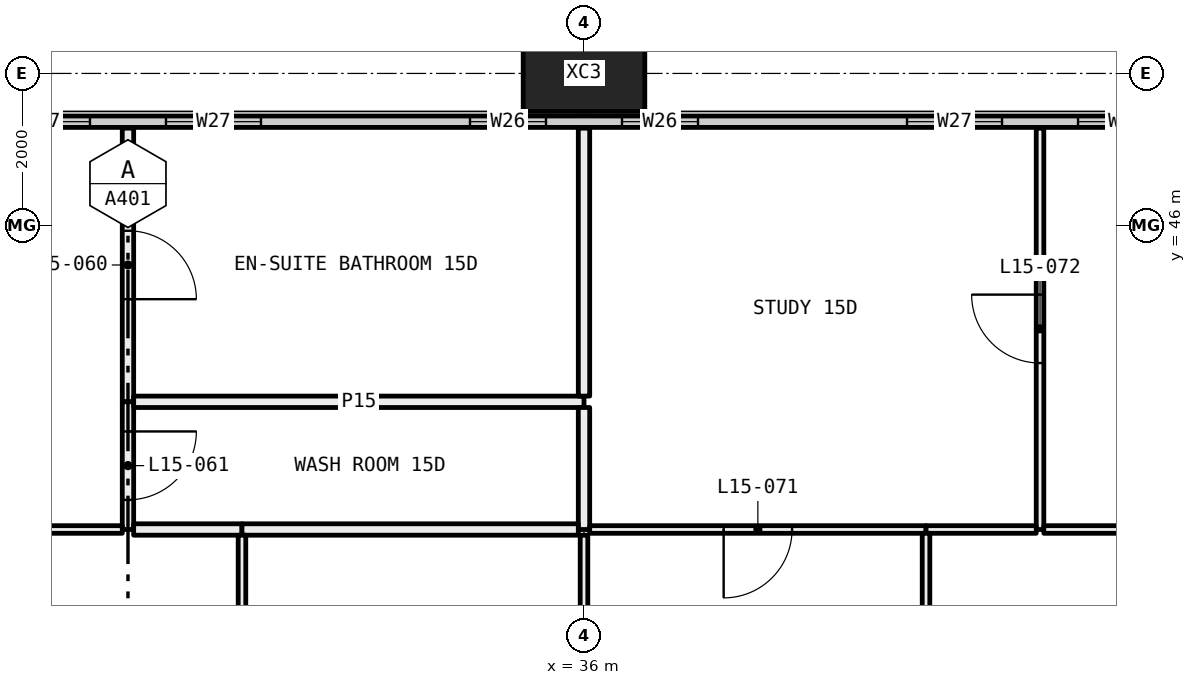
"""IFC4 building model, lengths in metres.
Left out: names, types, materials, properties, quantities, classifications, styles, units other than length and angle.
Written with IfcOpenShell. Run it as: python <this file> out.ifc"""

import sys

from ifc_helpers import new_model, si_unit, direction, frame, frame_2d, origin, origin_2d, place, context, subcontext, project, spatial, rectangle, hollow_rectangle, extrude, element, fill, save


model = new_model("IFC4")
c1 = context("Model", 3, precision=1e-05, world=origin(), true_north=direction((0.0, 1.0)))
c2 = subcontext(c1, "Body", "Model", "MODEL_VIEW")
j1 = project(units=[si_unit("LENGTHUNIT", "METRE"), si_unit("PLANEANGLEUNIT", "RADIAN")], contexts=[c1])
p1 = place(None, origin())
s1 = spatial("IfcSite", under=j1, at=p1, CompositionType="ELEMENT")
p2 = place(p1, origin())
s2 = spatial("IfcBuilding", under=s1, at=p2, CompositionType="ELEMENT")
p3 = place(p2, frame((0.0, 0.0, 64.5)))
s3 = spatial("IfcBuildingStorey", under=s2, at=p3, CompositionType="ELEMENT", Elevation=64.5)
p4 = place(p3, frame((36.0, 48.0, -0.4), z_axis=(0.0, 0.0, 1.0), x_axis=(1.0, 0.0, 0.0)))
e1 = element("IfcColumn", 1, at=p4, inside=s3, PredefinedType="COLUMN", context=c2, shape_type="SweptSolid", body=[
    extrude(hollow_rectangle(XDim=1.6, YDim=1.0, WallThickness=0.065, at=origin_2d()), origin(), (0.0, 0.0, 1.0), 3.45),
])
p5 = place(p3, frame((6.56, 47.365, 0.0), z_axis=(0.0, 0.0, 1.0), x_axis=(1.0, 0.0, 0.0)))
e2 = element("IfcWall", 2, at=p5, inside=s3, PredefinedType="ELEMENTEDWALL", context=c2, shape_type="SweptSolid", body=[
    extrude(rectangle(XDim=58.88, YDim=0.15, at=frame_2d((29.44, 0.0))), origin(), (0.0, 0.0, 1.0), 3.05),
])
p6 = place(p5, frame((0.44, 0.0, 0.45)))
e3 = element("IfcOpeningElement", 3, at=p6, cuts=e2, PredefinedType="OPENING", context=c2, shape_type="SweptSolid", body=[
    extrude(rectangle(XDim=4.5, YDim=2.55, at=frame_2d((2.25, 1.275))), frame((0.0, 0.085, 0.0), z_axis=(0.0, -1.0, 0.0), x_axis=(1.0, 0.0, 0.0)), (0.0, 0.0, 1.0), 0.17),
])
p7 = place(p5, frame((5.94, 0.0, 0.45)))
e4 = element("IfcOpeningElement", 4, at=p7, cuts=e2, PredefinedType="OPENING", context=c2, shape_type="SweptSolid", body=[
    extrude(rectangle(XDim=1.0, YDim=2.55, at=frame_2d((0.5, 1.275))), frame((0.0, 0.085, 0.0), z_axis=(0.0, -1.0, 0.0), x_axis=(1.0, 0.0, 0.0)), (0.0, 0.0, 1.0), 0.17),
])
p8 = place(p5, frame((9.69, 0.0, 0.45)))
e5 = element("IfcOpeningElement", 5, at=p8, cuts=e2, PredefinedType="OPENING", context=c2, shape_type="SweptSolid", body=[
    extrude(rectangle(XDim=1.25, YDim=2.55, at=frame_2d((0.625, 1.275))), frame((0.0, 0.085, 0.0), z_axis=(0.0, -1.0, 0.0), x_axis=(1.0, 0.0, 0.0)), (0.0, 0.0, 1.0), 0.17),
])
p9 = place(p5, frame((11.94, 0.0, 0.45)))
e6 = element("IfcOpeningElement", 6, at=p9, cuts=e2, PredefinedType="OPENING", context=c2, shape_type="SweptSolid", body=[
    extrude(rectangle(XDim=1.25, YDim=2.55, at=frame_2d((0.625, 1.275))), frame((0.0, 0.085, 0.0), z_axis=(0.0, -1.0, 0.0), x_axis=(1.0, 0.0, 0.0)), (0.0, 0.0, 1.0), 0.17),
])
p10 = place(p5, frame((15.94, 0.0, 0.45)))
e7 = element("IfcOpeningElement", 7, at=p10, cuts=e2, PredefinedType="OPENING", context=c2, shape_type="SweptSolid", body=[
    extrude(rectangle(XDim=1.0, YDim=2.55, at=frame_2d((0.5, 1.275))), frame((0.0, 0.085, 0.0), z_axis=(0.0, -1.0, 0.0), x_axis=(1.0, 0.0, 0.0)), (0.0, 0.0, 1.0), 0.17),
])
p11 = place(p5, frame((17.94, 0.0, 0.45)))
e8 = element("IfcOpeningElement", 8, at=p11, cuts=e2, PredefinedType="OPENING", context=c2, shape_type="SweptSolid", body=[
    extrude(rectangle(XDim=1.0, YDim=2.55, at=frame_2d((0.5, 1.275))), frame((0.0, 0.085, 0.0), z_axis=(0.0, -1.0, 0.0), x_axis=(1.0, 0.0, 0.0)), (0.0, 0.0, 1.0), 0.17),
])
p12 = place(p5, frame((21.69, 0.0, 0.45)))
e9 = element("IfcOpeningElement", 9, at=p12, cuts=e2, PredefinedType="OPENING", context=c2, shape_type="SweptSolid", body=[
    extrude(rectangle(XDim=1.25, YDim=2.55, at=frame_2d((0.625, 1.275))), frame((0.0, 0.085, 0.0), z_axis=(0.0, -1.0, 0.0), x_axis=(1.0, 0.0, 0.0)), (0.0, 0.0, 1.0), 0.17),
])
p13 = place(p5, frame((23.94, 0.0, 0.45)))
e10 = element("IfcOpeningElement", 10, at=p13, cuts=e2, PredefinedType="OPENING", context=c2, shape_type="SweptSolid", body=[
    extrude(rectangle(XDim=1.25, YDim=2.55, at=frame_2d((0.625, 1.275))), frame((0.0, 0.085, 0.0), z_axis=(0.0, -1.0, 0.0), x_axis=(1.0, 0.0, 0.0)), (0.0, 0.0, 1.0), 0.17),
])
p14 = place(p5, frame((27.94, 0.0, 0.45)))
e11 = element("IfcOpeningElement", 11, at=p14, cuts=e2, PredefinedType="OPENING", context=c2, shape_type="SweptSolid", body=[
    extrude(rectangle(XDim=1.0, YDim=2.55, at=frame_2d((0.5, 1.275))), frame((0.0, 0.085, 0.0), z_axis=(0.0, -1.0, 0.0), x_axis=(1.0, 0.0, 0.0)), (0.0, 0.0, 1.0), 0.17),
])
p15 = place(p5, frame((29.94, 0.0, 0.45)))
e12 = element("IfcOpeningElement", 12, at=p15, cuts=e2, PredefinedType="OPENING", context=c2, shape_type="SweptSolid", body=[
    extrude(rectangle(XDim=1.0, YDim=2.55, at=frame_2d((0.5, 1.275))), frame((0.0, 0.085, 0.0), z_axis=(0.0, -1.0, 0.0), x_axis=(1.0, 0.0, 0.0)), (0.0, 0.0, 1.0), 0.17),
])
p16 = place(p5, frame((33.69, 0.0, 0.45)))
e13 = element("IfcOpeningElement", 13, at=p16, cuts=e2, PredefinedType="OPENING", context=c2, shape_type="SweptSolid", body=[
    extrude(rectangle(XDim=1.25, YDim=2.55, at=frame_2d((0.625, 1.275))), frame((0.0, 0.085, 0.0), z_axis=(0.0, -1.0, 0.0), x_axis=(1.0, 0.0, 0.0)), (0.0, 0.0, 1.0), 0.17),
])
p17 = place(p5, frame((35.94, 0.0, 0.45)))
e14 = element("IfcOpeningElement", 14, at=p17, cuts=e2, PredefinedType="OPENING", context=c2, shape_type="SweptSolid", body=[
    extrude(rectangle(XDim=1.25, YDim=2.55, at=frame_2d((0.625, 1.275))), frame((0.0, 0.085, 0.0), z_axis=(0.0, -1.0, 0.0), x_axis=(1.0, 0.0, 0.0)), (0.0, 0.0, 1.0), 0.17),
])
p18 = place(p5, frame((39.94, 0.0, 0.45)))
e15 = element("IfcOpeningElement", 15, at=p18, cuts=e2, PredefinedType="OPENING", context=c2, shape_type="SweptSolid", body=[
    extrude(rectangle(XDim=1.0, YDim=2.55, at=frame_2d((0.5, 1.275))), frame((0.0, 0.085, 0.0), z_axis=(0.0, -1.0, 0.0), x_axis=(1.0, 0.0, 0.0)), (0.0, 0.0, 1.0), 0.17),
])
p19 = place(p5, frame((41.94, 0.0, 0.45)))
e16 = element("IfcOpeningElement", 16, at=p19, cuts=e2, PredefinedType="OPENING", context=c2, shape_type="SweptSolid", body=[
    extrude(rectangle(XDim=1.0, YDim=2.55, at=frame_2d((0.5, 1.275))), frame((0.0, 0.085, 0.0), z_axis=(0.0, -1.0, 0.0), x_axis=(1.0, 0.0, 0.0)), (0.0, 0.0, 1.0), 0.17),
])
p20 = place(p5, frame((45.69, 0.0, 0.45)))
e17 = element("IfcOpeningElement", 17, at=p20, cuts=e2, PredefinedType="OPENING", context=c2, shape_type="SweptSolid", body=[
    extrude(rectangle(XDim=1.25, YDim=2.55, at=frame_2d((0.625, 1.275))), frame((0.0, 0.085, 0.0), z_axis=(0.0, -1.0, 0.0), x_axis=(1.0, 0.0, 0.0)), (0.0, 0.0, 1.0), 0.17),
])
p21 = place(p5, frame((47.94, 0.0, 0.45)))
e18 = element("IfcOpeningElement", 18, at=p21, cuts=e2, PredefinedType="OPENING", context=c2, shape_type="SweptSolid", body=[
    extrude(rectangle(XDim=1.25, YDim=2.55, at=frame_2d((0.625, 1.275))), frame((0.0, 0.085, 0.0), z_axis=(0.0, -1.0, 0.0), x_axis=(1.0, 0.0, 0.0)), (0.0, 0.0, 1.0), 0.17),
])
p22 = place(p5, frame((51.94, 0.0, 0.45)))
e19 = element("IfcOpeningElement", 19, at=p22, cuts=e2, PredefinedType="OPENING", context=c2, shape_type="SweptSolid", body=[
    extrude(rectangle(XDim=1.0, YDim=2.55, at=frame_2d((0.5, 1.275))), frame((0.0, 0.085, 0.0), z_axis=(0.0, -1.0, 0.0), x_axis=(1.0, 0.0, 0.0)), (0.0, 0.0, 1.0), 0.17),
])
p23 = place(p5, frame((53.94, 0.0, 0.45)))
e20 = element("IfcOpeningElement", 20, at=p23, cuts=e2, PredefinedType="OPENING", context=c2, shape_type="SweptSolid", body=[
    extrude(rectangle(XDim=4.5, YDim=2.55, at=frame_2d((2.25, 1.275))), frame((0.0, 0.085, 0.0), z_axis=(0.0, -1.0, 0.0), x_axis=(1.0, 0.0, 0.0)), (0.0, 0.0, 1.0), 0.17),
])
p24 = place(p3, frame((30.0, 43.68, 0.0), z_axis=(0.0, 0.0, 1.0), x_axis=(0.0, 1.0, 0.0)))
e21 = element("IfcWall", 21, at=p24, inside=s3, PredefinedType="PARTITIONING", context=c2, shape_type="SweptSolid", body=[
    extrude(rectangle(XDim=3.6, YDim=0.15, at=frame_2d((1.8, 0.0))), origin(), (0.0, 0.0, 1.0), 3.05),
])
p25 = place(p24, frame((1.35, 0.0, 0.0)))
e22 = element("IfcOpeningElement", 22, at=p25, cuts=e21, PredefinedType="OPENING", context=c2, shape_type="SweptSolid", body=[
    extrude(rectangle(XDim=0.9, YDim=2.1, at=frame_2d((0.45, 1.05))), frame((0.0, 0.085, 0.0), z_axis=(0.0, -1.0, 0.0), x_axis=(1.0, 0.0, 0.0)), (0.0, 0.0, 1.0), 0.17),
])
p26 = place(p3, frame((30.0, 42.0, 0.0), z_axis=(0.0, 0.0, 1.0), x_axis=(0.0, 1.0, 0.0)))
e23 = element("IfcWall", 23, at=p26, inside=s3, PredefinedType="PARTITIONING", context=c2, shape_type="SweptSolid", body=[
    extrude(rectangle(XDim=1.68, YDim=0.15, at=frame_2d((0.84, 0.0))), origin(), (0.0, 0.0, 1.0), 3.05),
])
p27 = place(p26, frame((0.39, 0.0, 0.0)))
e24 = element("IfcOpeningElement", 24, at=p27, cuts=e23, PredefinedType="OPENING", context=c2, shape_type="SweptSolid", body=[
    extrude(rectangle(XDim=0.9, YDim=2.1, at=frame_2d((0.45, 1.05))), frame((0.0, 0.085, 0.0), z_axis=(0.0, -1.0, 0.0), x_axis=(1.0, 0.0, 0.0)), (0.0, 0.0, 1.0), 0.17),
])
p28 = place(p3, frame((26.0, 42.0, 0.0), z_axis=(0.0, 0.0, 1.0), x_axis=(1.0, 0.0, 0.0)))
e25 = element("IfcWall", 25, at=p28, inside=s3, PredefinedType="PARTITIONING", context=c2, shape_type="SweptSolid", body=[
    extrude(rectangle(XDim=3.925, YDim=0.1, at=frame_2d((1.962, 0.0))), origin(), (0.0, 0.0, 1.0), 3.05),
])
p29 = place(p28, frame((1.512, 0.0, 0.0)))
e26 = element("IfcOpeningElement", 26, at=p29, cuts=e25, PredefinedType="OPENING", context=c2, shape_type="SweptSolid", body=[
    extrude(rectangle(XDim=0.9, YDim=2.1, at=frame_2d((0.45, 1.05))), frame((0.0, 0.06, 0.0), z_axis=(0.0, -1.0, 0.0), x_axis=(1.0, 0.0, 0.0)), (0.0, 0.0, 1.0), 0.12),
])
p30 = place(p3, frame((30.075, 43.68, 0.0), z_axis=(0.0, 0.0, 1.0), x_axis=(1.0, 0.0, 0.0)))
e27 = element("IfcWall", 27, at=p30, inside=s3, PredefinedType="PARTITIONING", context=c2, shape_type="SweptSolid", body=[
    extrude(rectangle(XDim=5.925, YDim=0.15, at=frame_2d((2.962, 0.0))), origin(), (0.0, 0.0, 1.0), 2.45),
])
p31 = place(p3, frame((36.0, 43.755, 0.0), z_axis=(0.0, 0.0, 1.0), x_axis=(0.0, 1.0, 0.0)))
e28 = element("IfcWall", 28, at=p31, inside=s3, PredefinedType="PARTITIONING", context=c2, shape_type="SweptSolid", body=[
    extrude(rectangle(XDim=3.525, YDim=0.15, at=frame_2d((1.763, 0.0))), origin(), (0.0, 0.0, 1.0), 2.45),
])
p32 = place(p3, frame((36.0, 42.0, 0.0), z_axis=(0.0, 0.0, 1.0), x_axis=(0.0, 1.0, 0.0)))
e29 = element("IfcWall", 29, at=p32, inside=s3, PredefinedType="PARTITIONING", context=c2, shape_type="SweptSolid", body=[
    extrude(rectangle(XDim=1.605, YDim=0.15, at=frame_2d((0.802, 0.0))), origin(), (0.0, 0.0, 1.0), 2.45),
])
p33 = place(p3, frame((30.075, 42.0, 0.0), z_axis=(0.0, 0.0, 1.0), x_axis=(1.0, 0.0, 0.0)))
e30 = element("IfcWall", 30, at=p33, inside=s3, PredefinedType="PARTITIONING", context=c2, shape_type="SweptSolid", body=[
    extrude(rectangle(XDim=1.425, YDim=0.15, at=frame_2d((0.712, 0.0))), origin(), (0.0, 0.0, 1.0), 3.05),
])
p34 = place(p3, frame((31.5, 42.0, 0.0), z_axis=(0.0, 0.0, 1.0), x_axis=(1.0, 0.0, 0.0)))
e31 = element("IfcWall", 31, at=p34, inside=s3, PredefinedType="PARTITIONING", context=c2, shape_type="SweptSolid", body=[
    extrude(rectangle(XDim=4.425, YDim=0.15, at=frame_2d((2.212, 0.0))), origin(), (0.0, 0.0, 1.0), 2.45),
])
p35 = place(p3, frame((42.0, 42.0, 0.0), z_axis=(0.0, 0.0, 1.0), x_axis=(0.0, 1.0, 0.0)))
e32 = element("IfcWall", 32, at=p35, inside=s3, PredefinedType="PARTITIONING", context=c2, shape_type="SweptSolid", body=[
    extrude(rectangle(XDim=5.28, YDim=0.1, at=frame_2d((2.64, 0.0))), origin(), (0.0, 0.0, 1.0), 3.05),
])
p36 = place(p35, frame((2.19, 0.0, 0.0)))
e33 = element("IfcOpeningElement", 33, at=p36, cuts=e32, PredefinedType="OPENING", context=c2, shape_type="SweptSolid", body=[
    extrude(rectangle(XDim=0.9, YDim=2.1, at=frame_2d((0.45, 1.05))), frame((0.0, 0.06, 0.0), z_axis=(0.0, -1.0, 0.0), x_axis=(1.0, 0.0, 0.0)), (0.0, 0.0, 1.0), 0.12),
])
p37 = place(p3, frame((36.075, 42.0, 0.0), z_axis=(0.0, 0.0, 1.0), x_axis=(1.0, 0.0, 0.0)))
e34 = element("IfcWall", 34, at=p37, inside=s3, PredefinedType="PARTITIONING", context=c2, shape_type="SweptSolid", body=[
    extrude(rectangle(XDim=4.425, YDim=0.1, at=frame_2d((2.212, 0.0))), origin(), (0.0, 0.0, 1.0), 2.45),
])
p38 = place(p37, frame((1.762, 0.0, 0.0)))
e35 = element("IfcOpeningElement", 35, at=p38, cuts=e34, PredefinedType="OPENING", context=c2, shape_type="SweptSolid", body=[
    extrude(rectangle(XDim=0.9, YDim=2.1, at=frame_2d((0.45, 1.05))), frame((0.0, 0.06, 0.0), z_axis=(0.0, -1.0, 0.0), x_axis=(1.0, 0.0, 0.0)), (0.0, 0.0, 1.0), 0.12),
])
p39 = place(p3, frame((40.5, 42.0, 0.0), z_axis=(0.0, 0.0, 1.0), x_axis=(1.0, 0.0, 0.0)))
e36 = element("IfcWall", 36, at=p39, inside=s3, PredefinedType="PARTITIONING", context=c2, shape_type="SweptSolid", body=[
    extrude(rectangle(XDim=1.45, YDim=0.1, at=frame_2d((0.725, 0.0))), origin(), (0.0, 0.0, 1.0), 3.05),
])
p40 = place(p3, frame((42.05, 42.0, 0.0), z_axis=(0.0, 0.0, 1.0), x_axis=(1.0, 0.0, 0.0)))
e37 = element("IfcWall", 37, at=p40, inside=s3, PredefinedType="PARTITIONING", context=c2, shape_type="SweptSolid", body=[
    extrude(rectangle(XDim=3.95, YDim=0.1, at=frame_2d((1.975, 0.0))), origin(), (0.0, 0.0, 1.0), 3.05),
])
p41 = place(p3, frame((31.5, 36.1, 0.0), z_axis=(0.0, 0.0, 1.0), x_axis=(0.0, 1.0, 0.0)))
e38 = element("IfcWall", 38, at=p41, inside=s3, PredefinedType="PARTITIONING", context=c2, shape_type="SweptSolid", body=[
    extrude(rectangle(XDim=5.825, YDim=0.1, at=frame_2d((2.913, 0.0))), origin(), (0.0, 0.0, 1.0), 3.05),
])
p42 = place(p41, frame((2.462, 0.0, 0.0)))
e39 = element("IfcOpeningElement", 39, at=p42, cuts=e38, PredefinedType="OPENING", context=c2, shape_type="SweptSolid", body=[
    extrude(rectangle(XDim=0.9, YDim=2.1, at=frame_2d((0.45, 1.05))), frame((0.0, 0.06, 0.0), z_axis=(0.0, -1.0, 0.0), x_axis=(1.0, 0.0, 0.0)), (0.0, 0.0, 1.0), 0.12),
])
p43 = place(p3, frame((36.0, 36.8, 0.0), z_axis=(0.0, 0.0, 1.0), x_axis=(0.0, 1.0, 0.0)))
e40 = element("IfcWall", 40, at=p43, inside=s3, PredefinedType="PARTITIONING", context=c2, shape_type="SweptSolid", body=[
    extrude(rectangle(XDim=5.125, YDim=0.1, at=frame_2d((2.562, 0.0))), origin(), (0.0, 0.0, 1.0), 2.45),
])
p44 = place(p43, frame((2.113, 0.0, 0.0)))
e41 = element("IfcOpeningElement", 41, at=p44, cuts=e40, PredefinedType="OPENING", context=c2, shape_type="SweptSolid", body=[
    extrude(rectangle(XDim=0.9, YDim=2.1, at=frame_2d((0.45, 1.05))), frame((0.0, 0.06, 0.0), z_axis=(0.0, -1.0, 0.0), x_axis=(1.0, 0.0, 0.0)), (0.0, 0.0, 1.0), 0.12),
])
p45 = place(p3, frame((40.5, 36.1, 0.0), z_axis=(0.0, 0.0, 1.0), x_axis=(0.0, 1.0, 0.0)))
e42 = element("IfcWall", 42, at=p45, inside=s3, PredefinedType="PARTITIONING", context=c2, shape_type="SweptSolid", body=[
    extrude(rectangle(XDim=5.85, YDim=0.1, at=frame_2d((2.925, 0.0))), origin(), (0.0, 0.0, 1.0), 3.05),
])
p46 = place(p45, frame((2.475, 0.0, 0.0)))
e43 = element("IfcOpeningElement", 43, at=p46, cuts=e42, PredefinedType="OPENING", context=c2, shape_type="SweptSolid", body=[
    extrude(rectangle(XDim=0.9, YDim=2.1, at=frame_2d((0.45, 1.05))), frame((0.0, 0.06, 0.0), z_axis=(0.0, -1.0, 0.0), x_axis=(1.0, 0.0, 0.0)), (0.0, 0.0, 1.0), 0.12),
])
p47 = place(p12, origin())
e44 = element("IfcWindow", 44, at=p47, inside=s3, PartitioningType="SINGLE_PANEL", PredefinedType="WINDOW", context=c2, shape_type="SweptSolid", body=[
    extrude(rectangle(XDim=1.25, YDim=2.55, at=frame_2d((0.625, 1.275))), frame((0.0, 0.03, 0.0), z_axis=(0.0, -1.0, 0.0), x_axis=(1.0, 0.0, 0.0)), (0.0, 0.0, 1.0), 0.06),
])
fill(e9, e44)
p48 = place(p13, origin())
e45 = element("IfcWindow", 45, at=p48, inside=s3, PartitioningType="SINGLE_PANEL", PredefinedType="WINDOW", context=c2, shape_type="SweptSolid", body=[
    extrude(rectangle(XDim=1.25, YDim=2.55, at=frame_2d((0.625, 1.275))), frame((0.0, 0.03, 0.0), z_axis=(0.0, -1.0, 0.0), x_axis=(1.0, 0.0, 0.0)), (0.0, 0.0, 1.0), 0.06),
])
fill(e10, e45)
p49 = place(p14, origin())
e46 = element("IfcWindow", 46, at=p49, inside=s3, PartitioningType="SINGLE_PANEL", PredefinedType="WINDOW", context=c2, shape_type="SweptSolid", body=[
    extrude(rectangle(XDim=1.0, YDim=2.55, at=frame_2d((0.5, 1.275))), frame((0.0, 0.03, 0.0), z_axis=(0.0, -1.0, 0.0), x_axis=(1.0, 0.0, 0.0)), (0.0, 0.0, 1.0), 0.06),
])
fill(e11, e46)
p50 = place(p15, origin())
e47 = element("IfcWindow", 47, at=p50, inside=s3, PartitioningType="SINGLE_PANEL", PredefinedType="WINDOW", context=c2, shape_type="SweptSolid", body=[
    extrude(rectangle(XDim=1.0, YDim=2.55, at=frame_2d((0.5, 1.275))), frame((0.0, 0.03, 0.0), z_axis=(0.0, -1.0, 0.0), x_axis=(1.0, 0.0, 0.0)), (0.0, 0.0, 1.0), 0.06),
])
fill(e12, e47)
p51 = place(p16, origin())
e48 = element("IfcWindow", 48, at=p51, inside=s3, PartitioningType="SINGLE_PANEL", PredefinedType="WINDOW", context=c2, shape_type="SweptSolid", body=[
    extrude(rectangle(XDim=1.25, YDim=2.55, at=frame_2d((0.625, 1.275))), frame((0.0, 0.03, 0.0), z_axis=(0.0, -1.0, 0.0), x_axis=(1.0, 0.0, 0.0)), (0.0, 0.0, 1.0), 0.06),
])
fill(e13, e48)
p52 = place(p17, origin())
e49 = element("IfcWindow", 49, at=p52, inside=s3, PartitioningType="SINGLE_PANEL", PredefinedType="WINDOW", context=c2, shape_type="SweptSolid", body=[
    extrude(rectangle(XDim=1.25, YDim=2.55, at=frame_2d((0.625, 1.275))), frame((0.0, 0.03, 0.0), z_axis=(0.0, -1.0, 0.0), x_axis=(1.0, 0.0, 0.0)), (0.0, 0.0, 1.0), 0.06),
])
fill(e14, e49)
p53 = place(p25, frame((0.9, 0.0, 0.0), x_axis=(-1.0, 0.0, 0.0)))
e50 = element("IfcDoor", 50, at=p53, inside=s3, OperationType="SINGLE_SWING_LEFT", PredefinedType="DOOR", context=c2, shape_type="SweptSolid", body=[
    extrude(rectangle(XDim=0.9, YDim=2.1, at=frame_2d((0.45, 1.05))), frame((0.0, 0.025, 0.0), z_axis=(0.0, -1.0, 0.0), x_axis=(1.0, 0.0, 0.0)), (0.0, 0.0, 1.0), 0.05),
])
fill(e22, e50)
p54 = place(p27, frame((0.9, 0.0, 0.0), x_axis=(-1.0, 0.0, 0.0)))
e51 = element("IfcDoor", 51, at=p54, inside=s3, OperationType="SINGLE_SWING_RIGHT", PredefinedType="DOOR", context=c2, shape_type="SweptSolid", body=[
    extrude(rectangle(XDim=0.9, YDim=2.1, at=frame_2d((0.45, 1.05))), frame((0.0, 0.025, 0.0), z_axis=(0.0, -1.0, 0.0), x_axis=(1.0, 0.0, 0.0)), (0.0, 0.0, 1.0), 0.05),
])
fill(e24, e51)
p55 = place(p38, frame((0.9, 0.0, 0.0), x_axis=(-1.0, 0.0, 0.0)))
e52 = element("IfcDoor", 52, at=p55, inside=s3, OperationType="SINGLE_SWING_LEFT", PredefinedType="DOOR", context=c2, shape_type="SweptSolid", body=[
    extrude(rectangle(XDim=0.9, YDim=2.1, at=frame_2d((0.45, 1.05))), frame((0.0, 0.025, 0.0), z_axis=(0.0, -1.0, 0.0), x_axis=(1.0, 0.0, 0.0)), (0.0, 0.0, 1.0), 0.05),
])
fill(e35, e52)
p56 = place(p36, origin())
e53 = element("IfcDoor", 53, at=p56, inside=s3, OperationType="SINGLE_SWING_LEFT", PredefinedType="DOOR", context=c2, shape_type="SweptSolid", body=[
    extrude(rectangle(XDim=0.9, YDim=2.1, at=frame_2d((0.45, 1.05))), frame((0.0, 0.025, 0.0), z_axis=(0.0, -1.0, 0.0), x_axis=(1.0, 0.0, 0.0)), (0.0, 0.0, 1.0), 0.05),
])
fill(e33, e53)
save(model, sys.argv[1])
